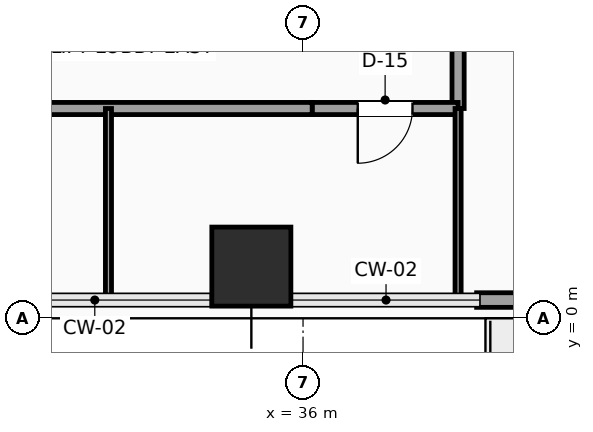
"""IFC4 building model, lengths in metres.
Left out: names, types, materials, properties, quantities, classifications, styles, units other than length and angle.
Written with IfcOpenShell. Run it as: python <this file> out.ifc"""

import sys

from ifc_helpers import new_model, si_unit, direction, frame, frame_2d, origin, origin_2d, place, context, subcontext, project, spatial, rectangle, extrude, element, fill, save


model = new_model("IFC4")
c1 = context("Model", 3, precision=1e-05, world=origin(), true_north=direction((0.0, 1.0)))
c2 = subcontext(c1, "Body", "Model", "MODEL_VIEW")
j1 = project(units=[si_unit("LENGTHUNIT", "METRE"), si_unit("PLANEANGLEUNIT", "RADIAN")], contexts=[c1])
p1 = place(None, origin())
s1 = spatial("IfcSite", under=j1, at=p1, CompositionType="ELEMENT")
p2 = place(p1, origin())
s2 = spatial("IfcBuilding", under=s1, at=p2, CompositionType="ELEMENT")
p3 = place(p2, frame((0.0, 0.0, 90.9)))
s3 = spatial("IfcBuildingStorey", under=s2, at=p3, CompositionType="ELEMENT", Elevation=90.9)
p4 = place(p3, frame((35.15, 0.85, 0.0), z_axis=(0.0, 0.0, 1.0), x_axis=(1.0, 0.0, 0.0)))
e1 = element("IfcColumn", 1, at=p4, inside=s3, PredefinedType="COLUMN", context=c2, shape_type="SweptSolid", body=[
    extrude(rectangle(XDim=1.3, YDim=1.3, at=origin_2d()), origin(), (0.0, 0.0, 1.0), 3.9),
])
p5 = place(p3, frame((48.145, 0.3, 0.0), z_axis=(0.0, 0.0, 1.0), x_axis=(-1.0, 0.0, 0.0)))
e2 = element("IfcWall", 2, at=p5, inside=s3, PredefinedType="SOLIDWALL", context=c2, shape_type="SweptSolid", body=[
    extrude(rectangle(XDim=9.29, YDim=0.24, at=frame_2d((4.645, 0.0))), origin(), (0.0, 0.0, 1.0), 3.575),
])
p6 = place(p5, frame((4.95, 0.0, 0.0)))
e3 = element("IfcOpeningElement", 3, at=p6, cuts=e2, PredefinedType="OPENING", context=c2, shape_type="SweptSolid", body=[
    extrude(rectangle(XDim=1.05, YDim=2.2, at=frame_2d((0.525, 1.1))), frame((0.0, 0.13, 0.0), z_axis=(0.0, -1.0, 0.0), x_axis=(1.0, 0.0, 0.0)), (0.0, 0.0, 1.0), 0.26),
])
p7 = place(p3, frame((38.55, 5.8, 0.0), z_axis=(0.0, 0.0, 1.0), x_axis=(0.0, -1.0, 0.0)))
e4 = element("IfcWall", 4, at=p7, inside=s3, PredefinedType="SOLIDWALL", context=c2, shape_type="SweptSolid", body=[
    extrude(rectangle(XDim=2.35, YDim=0.2, at=frame_2d((1.175, 0.0))), origin(), (0.0, 0.0, 1.0), 3.575),
])
p8 = place(p3, frame((38.55, 3.45, 0.0), z_axis=(0.0, 0.0, 1.0), x_axis=(-1.0, 0.0, 0.0)))
e5 = element("IfcWall", 5, at=p8, inside=s3, PredefinedType="SOLIDWALL", context=c2, shape_type="SweptSolid", body=[
    extrude(rectangle(XDim=2.4, YDim=0.2, at=frame_2d((1.2, 0.0))), origin(), (0.0, 0.0, 1.0), 3.067),
])
p9 = place(p8, frame((0.75, 0.0, 0.0)))
e6 = element("IfcOpeningElement", 6, at=p9, cuts=e5, PredefinedType="OPENING", context=c2, shape_type="SweptSolid", body=[
    extrude(rectangle(XDim=0.9, YDim=2.1, at=frame_2d((0.45, 1.05))), frame((0.0, 0.11, 0.0), z_axis=(0.0, -1.0, 0.0), x_axis=(1.0, 0.0, 0.0)), (0.0, 0.0, 1.0), 0.22),
])
p10 = place(p3, frame((36.15, 3.45, 0.0), z_axis=(0.0, 0.0, 1.0), x_axis=(-1.0, 0.0, 0.0)))
e7 = element("IfcWall", 7, at=p10, inside=s3, PredefinedType="SOLIDWALL", context=c2, shape_type="SweptSolid", body=[
    extrude(rectangle(XDim=14.6, YDim=0.2, at=frame_2d((7.3, 0.0))), origin(), (0.0, 0.0, 1.0), 3.067),
])
p11 = place(p10, frame((11.325, 0.0, 0.0)))
e8 = element("IfcOpeningElement", 8, at=p11, cuts=e7, PredefinedType="OPENING", context=c2, shape_type="SweptSolid", body=[
    extrude(rectangle(XDim=0.9, YDim=2.1, at=frame_2d((0.45, 1.05))), frame((0.0, 0.11, 0.0), z_axis=(0.0, -1.0, 0.0), x_axis=(1.0, 0.0, 0.0)), (0.0, 0.0, 1.0), 0.22),
])
p12 = place(p10, frame((5.7, 0.0, 0.0)))
e9 = element("IfcOpeningElement", 9, at=p12, cuts=e7, PredefinedType="OPENING", context=c2, shape_type="SweptSolid", body=[
    extrude(rectangle(XDim=0.9, YDim=2.1, at=frame_2d((0.45, 1.05))), frame((0.0, 0.11, 0.0), z_axis=(0.0, -1.0, 0.0), x_axis=(1.0, 0.0, 0.0)), (0.0, 0.0, 1.0), 0.22),
])
for number, where, z_axis, x_axis in (
    (10, (32.8, 0.3, 0.0), (0.0, 0.0, 1.0), (0.0, 1.0, 0.0)),
    (11, (38.55, 0.3, 0.0), (0.0, 0.0, 1.0), (0.0, 1.0, 0.0)),
):
    element("IfcWall", number, at=place(p3, frame(where, z_axis=z_axis, x_axis=x_axis)), inside=s3, PredefinedType="PARTITIONING", context=c2, shape_type="SweptSolid", body=[
        extrude(rectangle(XDim=3.15, YDim=0.1, at=frame_2d((1.575, 0.0))), origin(), (0.0, 0.0, 1.0), 3.575),
    ])
p13 = place(p9, origin())
e12 = element("IfcDoor", 12, at=p13, inside=s3, OperationType="SINGLE_SWING_RIGHT", PredefinedType="DOOR", context=c2, shape_type="SweptSolid", body=[
    extrude(rectangle(XDim=0.9, YDim=2.1, at=frame_2d((0.45, 1.05))), frame((0.0, 0.025, 0.0), z_axis=(0.0, -1.0, 0.0), x_axis=(1.0, 0.0, 0.0)), (0.0, 0.0, 1.0), 0.05),
])
fill(e6, e12)
save(model, sys.argv[1])
